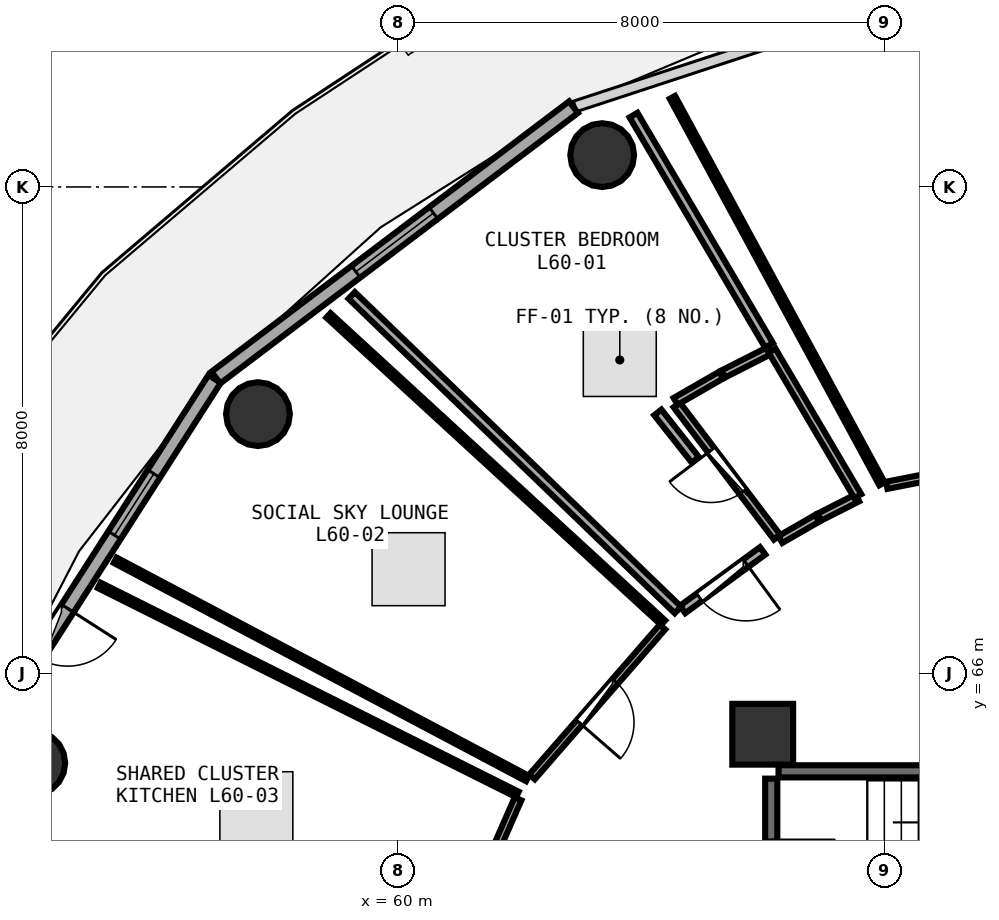
"""IFC4 building model, lengths in metres.
Left out: names, types, materials, properties, quantities, classifications, styles, units other than length and angle.
Written with IfcOpenShell. Run it as: python <this file> out.ifc"""

import sys

from ifc_helpers import new_model, si_unit, direction, frame, frame_2d, origin, origin_2d, place, context, subcontext, project, spatial, rectangle, circle, extrude, element, fill, save


model = new_model("IFC4")
c1 = context("Model", 3, precision=1e-05, world=origin(), true_north=direction((0.0, 1.0)))
c2 = subcontext(c1, "Body", "Model", "MODEL_VIEW")
j1 = project(units=[si_unit("LENGTHUNIT", "METRE"), si_unit("PLANEANGLEUNIT", "RADIAN")], contexts=[c1])
p1 = place(None, origin())
s1 = spatial("IfcSite", under=j1, at=p1, CompositionType="ELEMENT")
p2 = place(p1, origin())
s2 = spatial("IfcBuilding", under=s1, at=p2, CompositionType="ELEMENT")
p3 = place(p2, frame((0.0, 0.0, 234.45)))
s3 = spatial("IfcBuildingStorey", under=s2, at=p3, CompositionType="ELEMENT", Elevation=234.45)
p4 = place(p3, frame((66.0, 65.0, 0.0), z_axis=(0.0, 0.0, 1.0), x_axis=(1.0, 0.0, 0.0)))
e1 = element("IfcColumn", 1, at=p4, inside=s3, PredefinedType="PILASTER", context=c2, shape_type="SweptSolid", body=[
    extrude(rectangle(XDim=1.0, YDim=1.0, at=origin_2d()), origin(), (0.0, 0.0, 1.0), 3.75),
])
for number, where, z_axis, x_axis in (
    (2, (63.36, 74.524, 0.0), (0.0, 0.0, 1.0), (1.0, 0.0, 0.0)),
    (3, (57.698, 70.264, 0.0), (0.0, 0.0, 1.0), (1.0, 0.0, 0.0)),
    (4, (54.003, 64.526, 0.0), (0.0, 0.0, 1.0), (1.0, 0.0, 0.0)),
):
    element("IfcColumn", number, at=place(p3, frame(where, z_axis=z_axis, x_axis=x_axis)), inside=s3, PredefinedType="COLUMN", context=c2, shape_type="SweptSolid", body=[
        extrude(circle(Radius=0.525, at=origin_2d()), origin(), (0.0, 0.0, 1.0), 3.75),
    ])
p5 = place(p3, frame((62.888, 75.312, 0.0), z_axis=(0.0, 0.0, 1.0), x_axis=(-0.797701674595, -0.603052268338, 0.0)))
e5 = element("IfcWall", 5, at=p5, inside=s3, PredefinedType="SOLIDWALL", context=c2, shape_type="SweptSolid", body=[
    extrude(rectangle(XDim=7.374, YDim=0.24, at=frame_2d((3.687, 0.0))), origin(), (0.0, 0.0, 1.0), 3.475),
])
p6 = place(p5, frame((2.887, 0.0, 0.85)))
e6 = element("IfcOpeningElement", 6, at=p6, cuts=e5, PredefinedType="OPENING", context=c2, shape_type="SweptSolid", body=[
    extrude(rectangle(XDim=1.6, YDim=1.45, at=frame_2d((0.8, 0.725))), frame((0.0, 0.13, 0.0), z_axis=(0.0, -1.0, 0.0), x_axis=(1.0, 0.0, 0.0)), (0.0, 0.0, 1.0), 0.26),
])
p7 = place(p3, frame((56.986, 70.843, 0.0), z_axis=(0.0, 0.0, 1.0), x_axis=(-0.539539512973, -0.841960280501, 0.0)))
e7 = element("IfcWall", 7, at=p7, inside=s3, PredefinedType="SOLIDWALL", context=c2, shape_type="SweptSolid", body=[
    extrude(rectangle(XDim=7.115, YDim=0.24, at=frame_2d((3.557, 0.0))), origin(), (0.0, 0.0, 1.0), 3.475),
])
p8 = place(p7, frame((4.482, 0.0, 0.0)))
e8 = element("IfcOpeningElement", 8, at=p8, cuts=e7, PredefinedType="OPENING", context=c2, shape_type="SweptSolid", body=[
    extrude(rectangle(XDim=0.95, YDim=2.1, at=frame_2d((0.475, 1.05))), frame((0.0, 0.13, 0.0), z_axis=(0.0, -1.0, 0.0), x_axis=(1.0, 0.0, 0.0)), (0.0, 0.0, 1.0), 0.26),
])
p9 = place(p7, frame((1.852, 0.0, 0.85)))
e9 = element("IfcOpeningElement", 9, at=p9, cuts=e7, PredefinedType="OPENING", context=c2, shape_type="SweptSolid", body=[
    extrude(rectangle(XDim=1.2, YDim=1.45, at=frame_2d((0.6, 0.725))), frame((0.0, 0.13, 0.0), z_axis=(0.0, -1.0, 0.0), x_axis=(1.0, 0.0, 0.0)), (0.0, 0.0, 1.0), 0.26),
])
p10 = place(p3, frame((73.42, 64.39, 0.0), z_axis=(0.0, 0.0, 1.0), x_axis=(-1.0, 0.0, 0.0)))
e10 = element("IfcWall", 10, at=p10, inside=s3, PredefinedType="SHEAR", context=c2, shape_type="SweptSolid", body=[
    extrude(rectangle(XDim=7.16, YDim=0.2, at=frame_2d((3.58, 0.0))), origin(), (0.0, 0.0, 1.0), 3.49),
])
p11 = place(p3, frame((66.14, 64.27, 0.0), z_axis=(0.0, 0.0, 1.0), x_axis=(0.0, -1.0, 0.0)))
e11 = element("IfcWall", 11, at=p11, inside=s3, PredefinedType="SHEAR", context=c2, shape_type="SweptSolid", body=[
    extrude(rectangle(XDim=3.07, YDim=0.2, at=frame_2d((1.535, 0.0))), origin(), (0.0, 0.0, 1.0), 3.49),
])
p12 = place(p11, frame((1.01, 0.0, 0.0)))
e12 = element("IfcOpeningElement", 12, at=p12, cuts=e11, PredefinedType="OPENING", context=c2, shape_type="SweptSolid", body=[
    extrude(rectangle(XDim=1.05, YDim=2.1, at=frame_2d((0.525, 1.05))), frame((0.0, 0.11, 0.0), z_axis=(0.0, -1.0, 0.0), x_axis=(1.0, 0.0, 0.0)), (0.0, 0.0, 1.0), 0.22),
])
p13 = place(p3, frame((74.241, 70.315, 0.0), z_axis=(0.0, 0.0, 1.0), x_axis=(-0.981135287424, -0.193322393353, 0.0)))
e13 = element("IfcWall", 13, at=p13, inside=s3, PredefinedType="PARTITIONING", context=c2, shape_type="SweptSolid", body=[
    extrude(rectangle(XDim=6.321, YDim=0.12, at=frame_2d((3.16, 0.0))), origin(), (0.0, 0.0, 1.0), 3.025),
])
p14 = place(p13, frame((2.71, 0.0, 0.0)))
e14 = element("IfcOpeningElement", 14, at=p14, cuts=e13, PredefinedType="OPENING", context=c2, shape_type="SweptSolid", body=[
    extrude(rectangle(XDim=0.9, YDim=2.08, at=frame_2d((0.45, 1.04))), frame((0.0, 0.07, 0.0), z_axis=(0.0, -1.0, 0.0), x_axis=(1.0, 0.0, 0.0)), (0.0, 0.0, 1.0), 0.14),
])
p15 = place(p3, frame((66.237, 68.24, 0.0), z_axis=(0.0, 0.0, 1.0), x_axis=(-0.604267149991, 0.79678178408, 0.0)))
e15 = element("IfcWall", 15, at=p15, inside=s3, PredefinedType="PLUMBINGWALL", context=c2, shape_type="SweptSolid", body=[
    extrude(rectangle(XDim=2.732, YDim=0.13, at=frame_2d((1.366, 0.0))), origin(), (0.0, 0.0, 1.0), 3.025),
])
p16 = place(p15, frame((0.936, 0.0, 0.0)))
e16 = element("IfcOpeningElement", 16, at=p16, cuts=e15, PredefinedType="OPENING", context=c2, shape_type="SweptSolid", body=[
    extrude(rectangle(XDim=0.86, YDim=2.05, at=frame_2d((0.43, 1.025))), frame((0.0, 0.075, 0.0), z_axis=(0.0, -1.0, 0.0), x_axis=(1.0, 0.0, 0.0)), (0.0, 0.0, 1.0), 0.15),
])
p17 = place(p3, frame((65.999, 68.015, 0.0), z_axis=(0.0, 0.0, 1.0), x_axis=(-0.806790207918, -0.59083801537, 0.0)))
e17 = element("IfcWall", 17, at=p17, inside=s3, PredefinedType="PARTITIONING", context=c2, shape_type="SweptSolid", body=[
    extrude(rectangle(XDim=1.631, YDim=0.15, at=frame_2d((0.816, 0.0))), origin(), (0.0, 0.0, 1.0), 3.025),
])
p18 = place(p17, frame((0.341, 0.0, 0.0)))
e18 = element("IfcOpeningElement", 18, at=p18, cuts=e17, PredefinedType="OPENING", context=c2, shape_type="SweptSolid", body=[
    extrude(rectangle(XDim=0.95, YDim=2.08, at=frame_2d((0.475, 1.04))), frame((0.0, 0.085, 0.0), z_axis=(0.0, -1.0, 0.0), x_axis=(1.0, 0.0, 0.0)), (0.0, 0.0, 1.0), 0.17),
])
p19 = place(p3, frame((64.352, 66.763, 0.0), z_axis=(0.0, 0.0, 1.0), x_axis=(-0.656587461417, -0.75424989593, 0.0)))
e19 = element("IfcWall", 19, at=p19, inside=s3, PredefinedType="PARTITIONING", context=c2, shape_type="SweptSolid", body=[
    extrude(rectangle(XDim=3.267, YDim=0.12, at=frame_2d((1.634, 0.0))), origin(), (0.0, 0.0, 1.0), 3.025),
])
p20 = place(p19, frame((1.184, 0.0, 0.0)))
e20 = element("IfcOpeningElement", 20, at=p20, cuts=e19, PredefinedType="OPENING", context=c2, shape_type="SweptSolid", body=[
    extrude(rectangle(XDim=0.9, YDim=2.08, at=frame_2d((0.45, 1.04))), frame((0.0, 0.07, 0.0), z_axis=(0.0, -1.0, 0.0), x_axis=(1.0, 0.0, 0.0)), (0.0, 0.0, 1.0), 0.14),
])
p21 = place(p3, frame((61.976, 63.937, 0.0), z_axis=(0.0, 0.0, 1.0), x_axis=(-0.401802923717, -0.91572616567, 0.0)))
e21 = element("IfcWall", 21, at=p21, inside=s3, PredefinedType="PARTITIONING", context=c2, shape_type="SweptSolid", body=[
    extrude(rectangle(XDim=3.175, YDim=0.12, at=frame_2d((1.587, 0.0))), origin(), (0.0, 0.0, 1.0), 3.235),
])
p22 = place(p21, frame((1.137, 0.0, 0.0)))
e22 = element("IfcOpeningElement", 22, at=p22, cuts=e21, PredefinedType="OPENING", context=c2, shape_type="SweptSolid", body=[
    extrude(rectangle(XDim=0.9, YDim=2.08, at=frame_2d((0.45, 1.04))), frame((0.0, 0.07, 0.0), z_axis=(0.0, -1.0, 0.0), x_axis=(1.0, 0.0, 0.0)), (0.0, 0.0, 1.0), 0.14),
])
p23 = place(p3, frame((67.962, 69.117, 0.0), z_axis=(0.0, 0.0, 1.0), x_axis=(-0.476664873876, 0.879085091452, 0.0)))
e23 = element("IfcWall", 23, at=p23, inside=s3, PredefinedType="PARTITIONING", context=c2, shape_type="SweptSolid", body=[
    extrude(rectangle(XDim=7.231, YDim=0.1, at=frame_2d((3.615, 0.0))), origin(), (0.0, 0.0, 1.0), 3.075),
])
p24 = place(p3, frame((67.557, 68.888, 0.0), z_axis=(0.0, 0.0, 1.0), x_axis=(-0.891699149794, -0.452628574282, 0.0)))
e24 = element("IfcWall", 24, at=p24, inside=s3, PredefinedType="PLUMBINGWALL", context=c2, shape_type="SweptSolid", body=[
    extrude(rectangle(XDim=0.702, YDim=0.13, at=frame_2d((0.351, 0.0))), origin(), (0.0, 0.0, 1.0), 3.235),
])
p25 = place(p3, frame((66.896, 68.551, 0.0), z_axis=(0.0, 0.0, 1.0), x_axis=(-0.866301871779, -0.499520837356, 0.0)))
e25 = element("IfcWall", 25, at=p25, inside=s3, PredefinedType="PLUMBINGWALL", context=c2, shape_type="SweptSolid", body=[
    extrude(rectangle(XDim=0.699, YDim=0.13, at=frame_2d((0.35, 0.0))), origin(), (0.0, 0.0, 1.0), 3.48),
])
p26 = place(p3, frame((64.567, 70.474, 0.0), z_axis=(0.0, 0.0, 1.0), x_axis=(0.866585406338, 0.499028790273, 0.0)))
e26 = element("IfcWall", 26, at=p26, inside=s3, PredefinedType="PLUMBINGWALL", context=c2, shape_type="SweptSolid", body=[
    extrude(rectangle(XDim=0.864, YDim=0.13, at=frame_2d((0.432, 0.0))), origin(), (0.0, 0.0, 1.0), 3.025),
])
p27 = place(p3, frame((65.351, 70.924, 0.0), z_axis=(0.0, 0.0, 1.0), x_axis=(0.891825598475, 0.452379378293, 0.0)))
e27 = element("IfcWall", 27, at=p27, inside=s3, PredefinedType="PLUMBINGWALL", context=c2, shape_type="SweptSolid", body=[
    extrude(rectangle(XDim=0.868, YDim=0.13, at=frame_2d((0.434, 0.0))), origin(), (0.0, 0.0, 1.0), 3.175),
])
p28 = place(p3, frame((66.153, 71.309, 0.0), z_axis=(0.0, 0.0, 1.0), x_axis=(0.507776128274, -0.861489061773, 0.0)))
e28 = element("IfcWall", 28, at=p28, inside=s3, PredefinedType="PLUMBINGWALL", context=c2, shape_type="SweptSolid", body=[
    extrude(rectangle(XDim=2.78, YDim=0.13, at=frame_2d((1.39, 0.0))), origin(), (0.0, 0.0, 1.0), 3.175),
])
p29 = place(p3, frame((64.605, 67.044, 0.0), z_axis=(0.0, 0.0, 1.0), x_axis=(-0.719927885424, 0.694048874208, 0.0)))
e29 = element("IfcWall", 29, at=p29, inside=s3, PredefinedType="PARTITIONING", context=c2, shape_type="SweptSolid", body=[
    extrude(rectangle(XDim=7.453, YDim=0.15, at=frame_2d((3.727, 0.0))), origin(), (0.0, 0.0, 1.0), 3.075),
])
p30 = place(p3, frame((63.875, 75.181, 0.0), z_axis=(0.0, 0.0, 1.0), x_axis=(0.50737473807, -0.861725521943, 0.0)))
e30 = element("IfcWall", 30, at=p30, inside=s3, PredefinedType="PARTITIONING", context=c2, shape_type="SweptSolid", body=[
    extrude(rectangle(XDim=4.392, YDim=0.15, at=frame_2d((2.196, 0.0))), origin(), (0.0, 0.0, 1.0), 3.075),
])
p31 = place(p3, frame((64.275, 70.292, 0.0), z_axis=(0.0, 0.0, 1.0), x_axis=(0.620137292908, -0.784493300127, 0.0)))
e31 = element("IfcWall", 31, at=p31, inside=s3, PredefinedType="PARTITIONING", context=c2, shape_type="SweptSolid", body=[
    extrude(rectangle(XDim=0.995, YDim=0.15, at=frame_2d((0.498, 0.0))), origin(), (0.0, 0.0, 1.0), 3.025),
])
p32 = place(p3, frame((62.132, 64.272, 0.0), z_axis=(0.0, 0.0, 1.0), x_axis=(-0.883813456485, 0.467839474752, 0.0)))
e32 = element("IfcWall", 32, at=p32, inside=s3, PredefinedType="PARTITIONING", context=c2, shape_type="SweptSolid", body=[
    extrude(rectangle(XDim=7.673, YDim=0.1, at=frame_2d((3.836, 0.0))), origin(), (0.0, 0.0, 1.0), 3.025),
])
p33 = place(p3, frame((58.857, 71.888, 0.0), z_axis=(0.0, 0.0, 1.0), x_axis=(0.736669736632, -0.676252688815, 0.0)))
e33 = element("IfcWall", 33, at=p33, inside=s3, PredefinedType="PARTITIONING", context=c2, shape_type="SweptSolid", body=[
    extrude(rectangle(XDim=7.472, YDim=0.1, at=frame_2d((3.736, 0.0))), origin(), (0.0, 0.0, 1.0), 3.075),
])
p34 = place(p3, frame((55.088, 67.448, 0.0), z_axis=(0.0, 0.0, 1.0), x_axis=(0.894433542293, -0.447200892688, 0.0)))
e34 = element("IfcWall", 34, at=p34, inside=s3, PredefinedType="PARTITIONING", context=c2, shape_type="SweptSolid", body=[
    extrude(rectangle(XDim=7.688, YDim=0.1, at=frame_2d((3.844, 0.0))), origin(), (0.0, 0.0, 1.0), 3.025),
])
p35 = place(p6, origin())
e35 = element("IfcWindow", 35, at=p35, inside=s3, PartitioningType="SINGLE_PANEL", PredefinedType="WINDOW", context=c2, shape_type="SweptSolid", body=[
    extrude(rectangle(XDim=1.6, YDim=1.45, at=frame_2d((0.8, 0.725))), frame((0.0, 0.03, 0.0), z_axis=(0.0, -1.0, 0.0), x_axis=(1.0, 0.0, 0.0)), (0.0, 0.0, 1.0), 0.06),
])
fill(e6, e35)
p36 = place(p8, frame((0.95, 0.0, 0.0), z_axis=(0.0, 0.0, 1.0), x_axis=(-1.0, 0.0, 0.0)))
e36 = element("IfcDoor", 36, at=p36, inside=s3, OperationType="SINGLE_SWING_RIGHT", PredefinedType="DOOR", context=c2, shape_type="SweptSolid", body=[
    extrude(rectangle(XDim=0.95, YDim=2.1, at=frame_2d((0.475, 1.05))), frame((0.0, 0.025, 0.0), z_axis=(0.0, -1.0, 0.0), x_axis=(1.0, 0.0, 0.0)), (0.0, 0.0, 1.0), 0.05),
])
fill(e8, e36)
p37 = place(p9, origin())
e37 = element("IfcWindow", 37, at=p37, inside=s3, PartitioningType="SINGLE_PANEL", PredefinedType="WINDOW", context=c2, shape_type="SweptSolid", body=[
    extrude(rectangle(XDim=1.2, YDim=1.45, at=frame_2d((0.6, 0.725))), frame((0.0, 0.03, 0.0), z_axis=(0.0, -1.0, 0.0), x_axis=(1.0, 0.0, 0.0)), (0.0, 0.0, 1.0), 0.06),
])
fill(e9, e37)
p38 = place(p12, origin())
e38 = element("IfcDoor", 38, at=p38, inside=s3, OperationType="SINGLE_SWING_LEFT", PredefinedType="DOOR", context=c2, shape_type="SweptSolid", body=[
    extrude(rectangle(XDim=1.05, YDim=2.1, at=frame_2d((0.525, 1.05))), frame((0.0, 0.025, 0.0), z_axis=(0.0, -1.0, 0.0), x_axis=(1.0, 0.0, 0.0)), (0.0, 0.0, 1.0), 0.05),
])
fill(e12, e38)
p39 = place(p16, origin())
e39 = element("IfcDoor", 39, at=p39, inside=s3, OperationType="SINGLE_SWING_RIGHT", PredefinedType="DOOR", context=c2, shape_type="SweptSolid", body=[
    extrude(rectangle(XDim=0.86, YDim=2.05, at=frame_2d((0.43, 1.025))), frame((0.0, 0.025, 0.0), z_axis=(0.0, -1.0, 0.0), x_axis=(1.0, 0.0, 0.0)), (0.0, 0.0, 1.0), 0.05),
])
fill(e16, e39)
p40 = place(p18, origin())
e40 = element("IfcDoor", 40, at=p40, inside=s3, OperationType="SINGLE_SWING_LEFT", PredefinedType="DOOR", context=c2, shape_type="SweptSolid", body=[
    extrude(rectangle(XDim=0.95, YDim=2.08, at=frame_2d((0.475, 1.04))), frame((0.0, 0.025, 0.0), z_axis=(0.0, -1.0, 0.0), x_axis=(1.0, 0.0, 0.0)), (0.0, 0.0, 1.0), 0.05),
])
fill(e18, e40)
p41 = place(p20, origin())
e41 = element("IfcDoor", 41, at=p41, inside=s3, OperationType="SINGLE_SWING_RIGHT", PredefinedType="DOOR", context=c2, shape_type="SweptSolid", body=[
    extrude(rectangle(XDim=0.9, YDim=2.08, at=frame_2d((0.45, 1.04))), frame((0.0, 0.025, 0.0), z_axis=(0.0, -1.0, 0.0), x_axis=(1.0, 0.0, 0.0)), (0.0, 0.0, 1.0), 0.05),
])
fill(e20, e41)
save(model, sys.argv[1])
